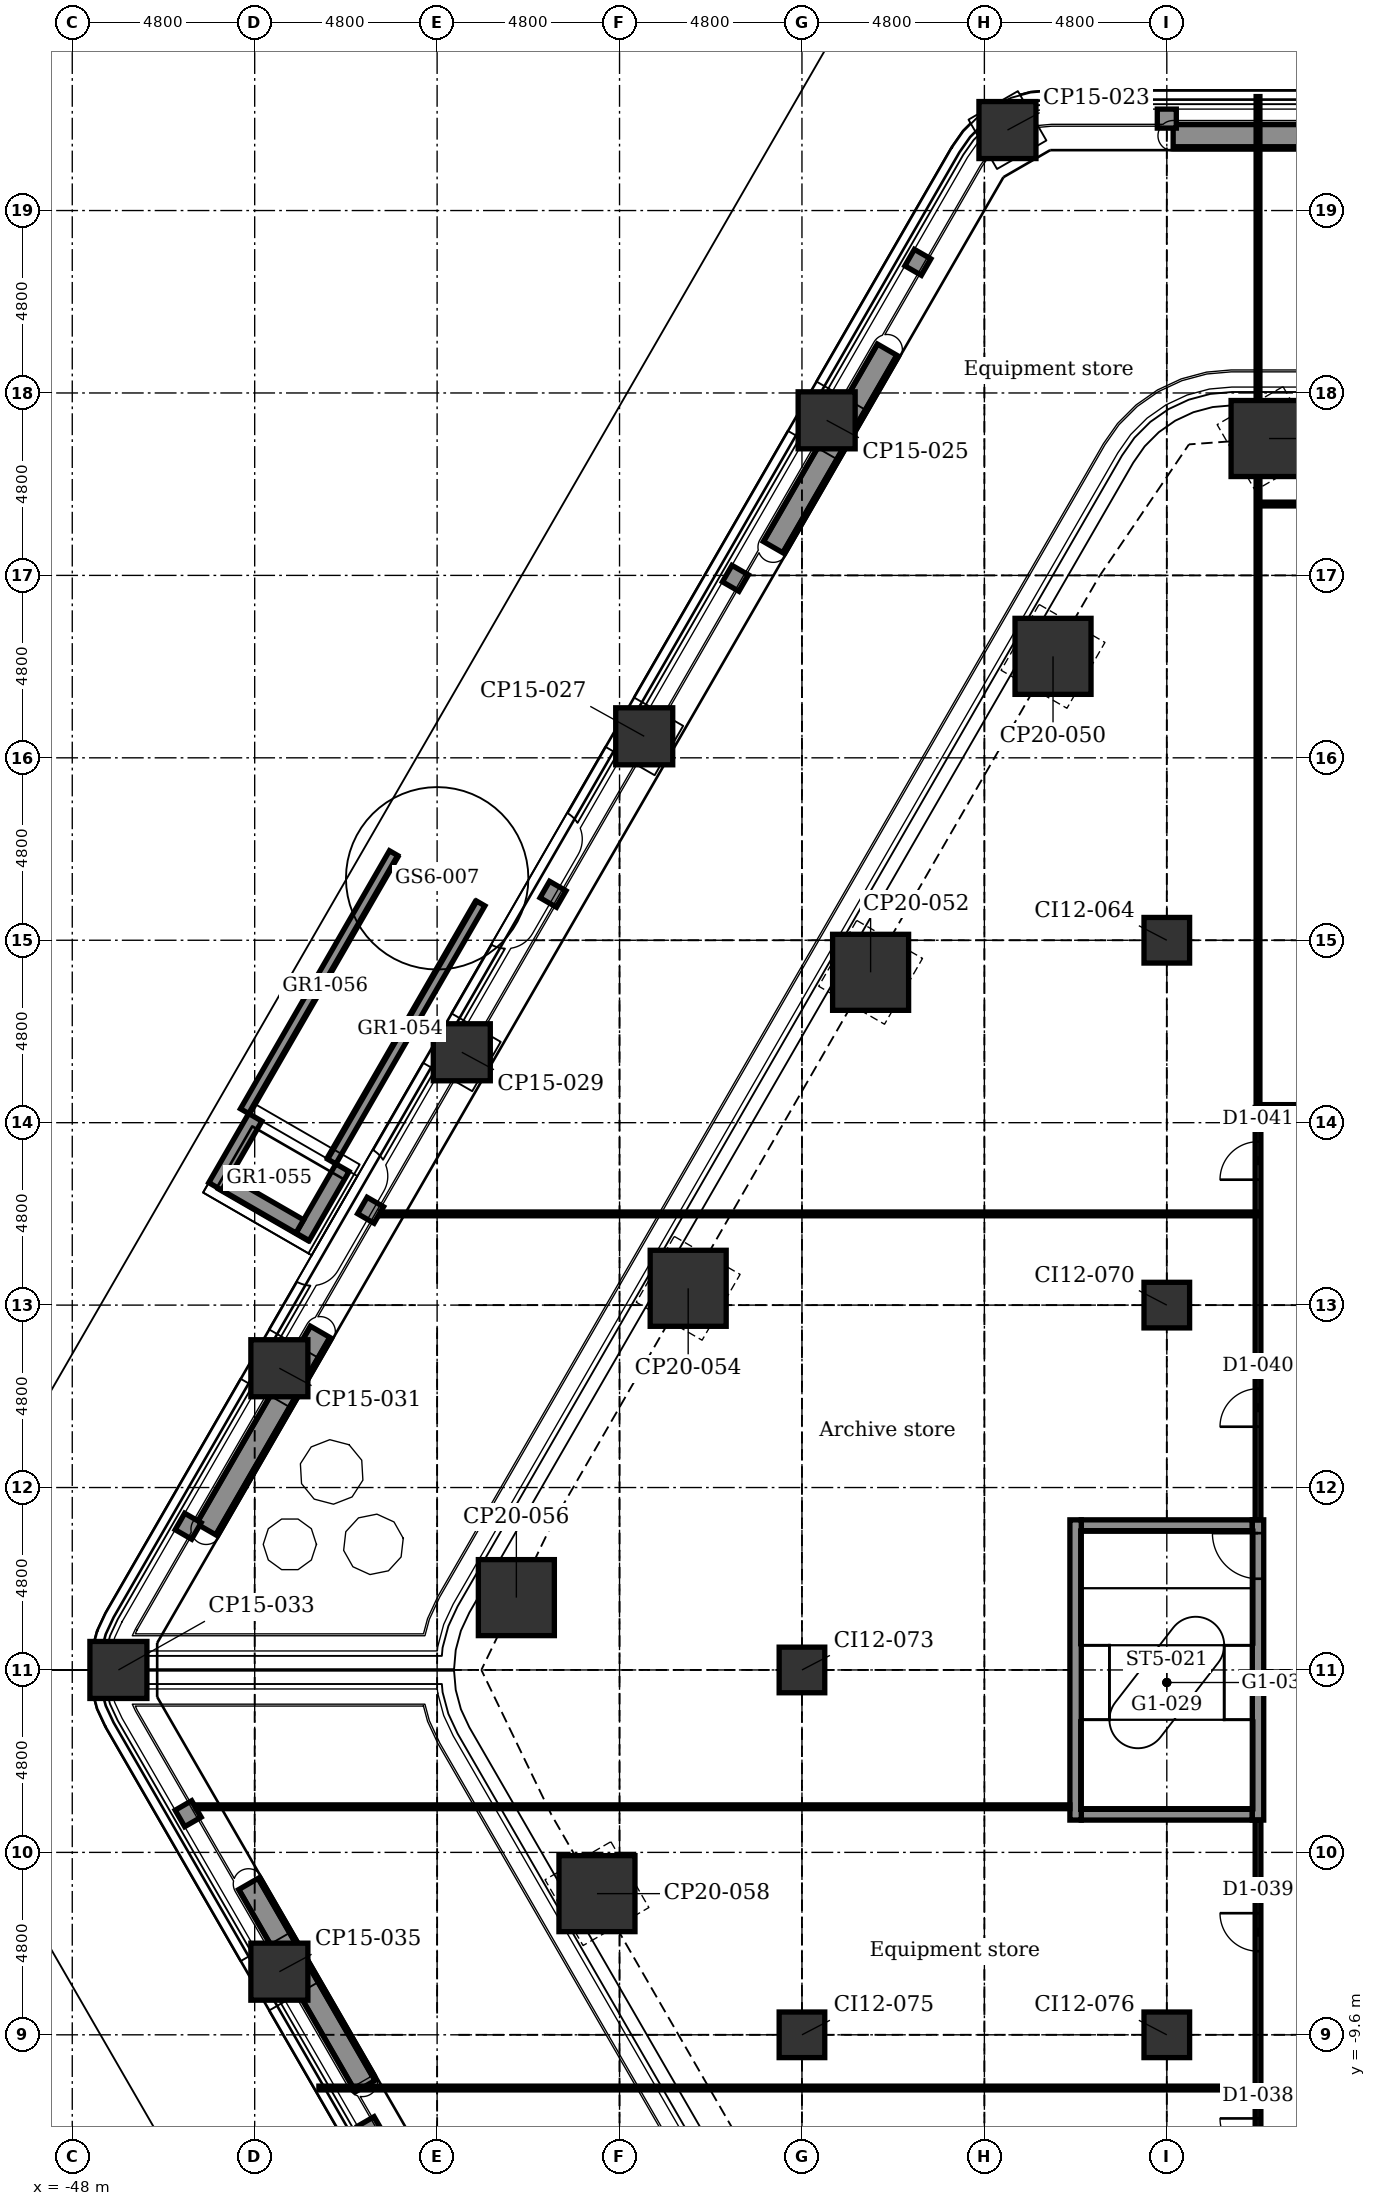
"""IFC4 building model, lengths in metres.
Left out: names, types, materials, properties, quantities, classifications, styles, units other than length and angle.
Written with IfcOpenShell. Run it as: python <this file> out.ifc"""

import sys

from ifc_helpers import new_model, si_unit, direction, frame, frame_2d, origin, origin_2d, place, context, subcontext, project, spatial, polyline, rectangle, outline, extrude, element, fill, save


model = new_model("IFC4")
c1 = context("Model", 3, precision=1e-05, world=origin(), true_north=direction((0.0, 1.0)))
c2 = subcontext(c1, "Body", "Model", "MODEL_VIEW")
j1 = project(units=[si_unit("LENGTHUNIT", "METRE"), si_unit("PLANEANGLEUNIT", "RADIAN")], contexts=[c1])
p1 = place(None, origin())
s1 = spatial("IfcSite", under=j1, at=p1, CompositionType="ELEMENT")
p2 = place(p1, origin())
s2 = spatial("IfcBuilding", under=s1, at=p2, CompositionType="ELEMENT")
p3 = place(p2, frame((0.0, 0.0, 12.4)))
s3 = spatial("IfcBuildingStorey", under=s2, at=p3, CompositionType="ELEMENT", Elevation=12.4)
for number, where, z_axis, x_axis in (
    (1, (-23.393, 40.518, -0.3), (0.0, 0.0, 1.0), (0.866, 0.5, 0.0)),
    (2, (-42.551, -7.939, -0.3), (0.0, 0.0, 1.0), (0.866, 0.5, 0.0)),
    (3, (-46.786, 0.0, -0.3), (0.0, 0.0, 1.0), (1.0, 0.0, 0.0)),
    (4, (-42.551, 7.939, -0.3), (0.0, 0.0, 1.0), (0.5, 0.866, 0.0)),
    (5, (-37.75, 16.253, -0.3), (0.0, 0.0, 1.0), (0.5, 0.866, 0.0)),
    (6, (-32.95, 24.567, -0.3), (0.0, 0.0, 1.0), (0.5, 0.866, 0.0)),
    (7, (-28.15, 32.88, -0.3), (0.0, 0.0, 1.0), (0.5, 0.866, 0.0)),
):
    element("IfcColumn", number, at=place(p3, frame(where, z_axis=z_axis, x_axis=x_axis)), inside=s3, PredefinedType="COLUMN", context=c2, shape_type="SweptSolid", body=[
        extrude(rectangle(XDim=1.5, YDim=1.5, at=origin_2d()), origin(), (0.0, 0.0, 1.0), 5.05),
    ])
for number, where, z_axis, x_axis in (
    (8, (-34.194, -5.885, -0.3), (0.0, 0.0, 1.0), (0.866, 0.5, 0.0)),
    (9, (-36.315, 1.904, -0.3), (0.0, 0.0, 1.0), (1.0, 0.0, 0.0)),
    (10, (-31.794, 10.042, -0.3), (0.0, 0.0, 1.0), (0.5, 0.866, 0.0)),
    (11, (-26.994, 18.356, -0.3), (0.0, 0.0, 1.0), (0.5, 0.866, 0.0)),
    (12, (-22.194, 26.67, -0.3), (0.0, 0.0, 1.0), (0.5, 0.866, 0.0)),
    (13, (-16.509, 32.401, -0.3), (0.0, 0.0, 1.0), (0.866, 0.5, 0.0)),
):
    element("IfcColumn", number, at=place(p3, frame(where, z_axis=z_axis, x_axis=x_axis)), inside=s3, PredefinedType="COLUMN", context=c2, shape_type="SweptSolid", body=[
        extrude(rectangle(XDim=2.0, YDim=2.0, at=origin_2d()), origin(), (0.0, 0.0, 1.0), 5.05),
    ])
for number, where, z_axis, x_axis in (
    (14, (-28.8, -9.6, -0.3), (0.0, 0.0, 1.0), (1.0, 0.0, 0.0)),
    (15, (-28.8, 0.0, -0.3), (0.0, 0.0, 1.0), (1.0, 0.0, 0.0)),
    (16, (-19.2, -9.6, -0.3), (0.0, 0.0, 1.0), (1.0, 0.0, 0.0)),
    (17, (-19.2, 9.6, -0.3), (0.0, 0.0, 1.0), (1.0, 0.0, 0.0)),
    (18, (-19.2, 19.2, -0.3), (0.0, 0.0, 1.0), (1.0, 0.0, 0.0)),
):
    element("IfcColumn", number, at=place(p3, frame(where, z_axis=z_axis, x_axis=x_axis)), inside=s3, PredefinedType="COLUMN", context=c2, shape_type="SweptSolid", body=[
        extrude(rectangle(XDim=1.2, YDim=1.2, at=origin_2d()), origin(), (0.0, 0.0, 1.0), 5.05),
    ])
for number, where, z_axis, x_axis in (
    (19, (-21.45, -3.8, -0.3), (0.0, 0.0, 1.0), (1.0, 0.0, 0.0)),
    (20, (-21.45, 3.8, -0.3), (0.0, 0.0, 1.0), (1.0, 0.0, 0.0)),
):
    element("IfcWall", number, at=place(p3, frame(where, z_axis=z_axis, x_axis=x_axis)), inside=s3, PredefinedType="STANDARD", context=c2, shape_type="SweptSolid", body=[
        extrude(rectangle(XDim=4.5, YDim=0.3, at=frame_2d((2.25, 0.0))), origin(), (0.0, 0.0, 1.0), 5.05),
    ])
p4 = place(p3, frame((-21.6, -3.95, -0.3), z_axis=(0.0, 0.0, 1.0), x_axis=(0.0, 1.0, 0.0)))
e21 = element("IfcWall", 21, at=p4, inside=s3, PredefinedType="STANDARD", context=c2, shape_type="SweptSolid", body=[
    extrude(rectangle(XDim=7.9, YDim=0.3, at=frame_2d((3.95, 0.0))), origin(), (0.0, 0.0, 1.0), 5.05),
])
p5 = place(p3, frame((-16.8, -3.95, -0.3), z_axis=(0.0, 0.0, 1.0), x_axis=(0.0, 1.0, 0.0)))
e22 = element("IfcWall", 22, at=p5, inside=s3, PredefinedType="STANDARD", context=c2, shape_type="SweptSolid", body=[
    extrude(rectangle(XDim=7.9, YDim=0.3, at=frame_2d((3.95, 0.0))), origin(), (0.0, 0.0, 1.0), 5.05),
])
p6 = place(p5, frame((6.35, 0.0, 0.3)))
e23 = element("IfcOpeningElement", 23, at=p6, cuts=e22, PredefinedType="OPENING", context=c2, shape_type="SweptSolid", body=[
    extrude(rectangle(XDim=1.2, YDim=2.1, at=frame_2d((0.6, 1.05))), frame((0.0, 0.16, 0.0), z_axis=(0.0, -1.0, 0.0), x_axis=(1.0, 0.0, 0.0)), (0.0, 0.0, 1.0), 0.32),
])
p7 = place(p3, frame((-19.033, 40.369, 5.0), z_axis=(0.0, 0.0, 1.0), x_axis=(1.0, 0.0, 0.0)))
e24 = element("IfcWall", 24, at=p7, inside=s3, PredefinedType="USERDEFINED", context=c2, shape_type="SweptSolid", body=[
    extrude(rectangle(XDim=6.0, YDim=0.6, at=frame_2d((3.0, 0.0))), origin(), (0.0, 0.0, 1.0), 0.7),
])
p8 = place(p3, frame((-40.292, -10.951, 5.0), z_axis=(0.0, 0.0, 1.0), x_axis=(-0.499976998774, 0.866038683141, 0.0)))
e25 = element("IfcWall", 25, at=p8, inside=s3, PredefinedType="USERDEFINED", context=c2, shape_type="SweptSolid", body=[
    extrude(rectangle(XDim=6.144, YDim=0.6, at=frame_2d((3.072, 0.0))), origin(), (0.0, 0.0, 1.0), 0.7),
])
for number, where, z_axis, x_axis in (
    (26, (-29.558, 29.543, 5.0), (0.0, 0.0, 1.0), (0.5, 0.866, 0.0)),
    (27, (-44.477, 3.702, 5.0), (0.0, 0.0, 1.0), (0.5, 0.866, 0.0)),
):
    element("IfcWall", number, at=place(p3, frame(where, z_axis=z_axis, x_axis=x_axis)), inside=s3, PredefinedType="USERDEFINED", context=c2, shape_type="SweptSolid", body=[
        extrude(rectangle(XDim=6.0, YDim=0.6, at=frame_2d((3.0, 0.0))), origin(), (0.0, 0.0, 1.0), 0.7),
    ])
for number, where, z_axis, x_axis in (
    (28, (-37.251, 20.167, 0.0), (0.0, 0.0, 1.0), (-0.5, -0.866, 0.0)),
    (29, (-39.546, 21.492, 0.0), (0.0, 0.0, 1.0), (-0.5, -0.866, 0.0)),
):
    element("IfcWall", number, at=place(p3, frame(where, z_axis=z_axis, x_axis=x_axis)), inside=s3, PredefinedType="SOLIDWALL", context=c2, shape_type="SweptSolid", body=[
        extrude(outline(polyline([(0.0, 0.0), (7.84, 0.0), (7.84, 5.1), (0.0, 0.272), (0.0, 0.0)])), frame((0.0, 0.125, 0.0), z_axis=(0.0, -1.0, 0.0), x_axis=(1.0, 0.0, 0.0)), (0.0, 0.0, 1.0), 0.25),
    ])
for number, where, z_axis, x_axis in (
    (30, (-44.235, 12.722, 0.45), (0.0, 0.0, 1.0), (0.5, 0.866, 0.0)),
    (31, (-41.94, 11.397, 0.45), (0.0, 0.0, 1.0), (0.5, 0.866, 0.0)),
):
    element("IfcWall", number, at=place(p3, frame(where, z_axis=z_axis, x_axis=x_axis)), inside=s3, PredefinedType="SOLIDWALL", context=c2, shape_type="SweptSolid", body=[
        extrude(rectangle(XDim=2.1, YDim=0.4, at=frame_2d((1.05, 0.0))), origin(), (0.0, 0.0, 1.0), 4.35),
    ])
p9 = place(p3, frame((-42.013, 11.67, 0.45), z_axis=(0.0, 0.0, 1.0), x_axis=(-0.866017533419, 0.500013631625, 0.0)))
e32 = element("IfcWall", 32, at=p9, inside=s3, PredefinedType="SOLIDWALL", context=c2, shape_type="SweptSolid", body=[
    extrude(rectangle(XDim=2.25, YDim=0.4, at=frame_2d((1.125, 0.0))), origin(), (0.0, 0.0, 1.0), 4.35),
])
for number, where, z_axis, x_axis in (
    (33, (-19.45, 40.819, 0.0), (0.0, 0.0, 1.0), (1.0, 0.0, 0.0)),
    (34, (-40.025, -12.312, 0.0), (0.0, 0.0, 1.0), (-0.5, 0.866, 0.0)),
    (35, (-44.825, -3.999, 0.0), (0.0, 0.0, 1.0), (-0.5, 0.866, 0.0)),
    (36, (-45.075, 3.565, 0.0), (0.0, 0.0, 1.0), (0.5, 0.866, 0.0)),
    (37, (-40.275, 11.879, 0.0), (0.0, 0.0, 1.0), (0.5, 0.866, 0.0)),
):
    element("IfcWall", number, at=place(p3, frame(where, z_axis=z_axis, x_axis=x_axis)), inside=s3, PredefinedType="SOLIDWALL", context=c2, shape_type="SweptSolid", body=[
        extrude(rectangle(XDim=0.5, YDim=0.5, at=frame_2d((0.25, 0.0))), origin(), (0.0, 0.0, 1.0), 4.45),
    ])
for number, where, z_axis, x_axis in (
    (38, (-35.475, 20.194, 0.0), (0.0, 0.0, 1.0), (0.5, 0.866, 0.0)),
    (39, (-30.675, 28.507, 0.0), (0.0, 0.0, 1.0), (0.5, 0.866, 0.0)),
    (40, (-25.875, 36.821, 0.0), (0.0, 0.0, 1.0), (0.5, 0.866, 0.0)),
):
    element("IfcWall", number, at=place(p3, frame(where, z_axis=z_axis, x_axis=x_axis)), inside=s3, PredefinedType="SOLIDWALL", context=c2, shape_type="SweptSolid", body=[
        extrude(rectangle(XDim=0.5, YDim=0.5, at=frame_2d((0.25, 0.0))), origin(), (0.0, 0.0, 1.0), 4.45),
    ])
p10 = place(p3, frame((-16.8, 14.8, 0.0), z_axis=(0.0, 0.0, 1.0), x_axis=(0.0, 1.0, 0.0)))
e41 = element("IfcWall", 41, at=p10, inside=s3, PredefinedType="PARTITIONING", context=c2, shape_type="SweptSolid", body=[
    extrude(rectangle(XDim=26.599, YDim=0.1, at=frame_2d((13.3, 0.0))), origin(), (0.0, 0.0, 1.0), 4.7),
])
p11 = place(p3, frame((-16.8, -13.6, 0.0), z_axis=(0.0, 0.0, 1.0), x_axis=(0.0, 1.0, 0.0)))
e42 = element("IfcWall", 42, at=p11, inside=s3, PredefinedType="PARTITIONING", context=c2, shape_type="SweptSolid", body=[
    extrude(rectangle(XDim=9.65, YDim=0.15, at=frame_2d((4.825, 0.0))), origin(), (0.0, 0.0, 1.0), 4.7),
])
p12 = place(p11, frame((0.8, 0.0, 0.0)))
e43 = element("IfcOpeningElement", 43, at=p12, cuts=e42, PredefinedType="OPENING", context=c2, shape_type="SweptSolid", body=[
    extrude(rectangle(XDim=1.0, YDim=2.1, at=frame_2d((0.5, 1.05))), frame((0.0, 0.085, 0.0), z_axis=(0.0, -1.0, 0.0), x_axis=(1.0, 0.0, 0.0)), (0.0, 0.0, 1.0), 0.17),
])
p13 = place(p11, frame((6.2, 0.0, 0.0)))
e44 = element("IfcOpeningElement", 44, at=p13, cuts=e42, PredefinedType="OPENING", context=c2, shape_type="SweptSolid", body=[
    extrude(rectangle(XDim=1.0, YDim=2.1, at=frame_2d((0.5, 1.05))), frame((0.0, 0.085, 0.0), z_axis=(0.0, -1.0, 0.0), x_axis=(1.0, 0.0, 0.0)), (0.0, 0.0, 1.0), 0.17),
])
p14 = place(p3, frame((-16.8, 3.95, 0.0), z_axis=(0.0, 0.0, 1.0), x_axis=(0.0, 1.0, 0.0)))
e45 = element("IfcWall", 45, at=p14, inside=s3, PredefinedType="PARTITIONING", context=c2, shape_type="SweptSolid", body=[
    extrude(rectangle(XDim=10.85, YDim=0.15, at=frame_2d((5.425, 0.0))), origin(), (0.0, 0.0, 1.0), 4.7),
])
p15 = place(p14, frame((2.45, 0.0, 0.0)))
e46 = element("IfcOpeningElement", 46, at=p15, cuts=e45, PredefinedType="OPENING", context=c2, shape_type="SweptSolid", body=[
    extrude(rectangle(XDim=1.0, YDim=2.1, at=frame_2d((0.5, 1.05))), frame((0.0, 0.085, 0.0), z_axis=(0.0, -1.0, 0.0), x_axis=(1.0, 0.0, 0.0)), (0.0, 0.0, 1.0), 0.17),
])
p16 = place(p14, frame((8.95, 0.0, 0.0)))
e47 = element("IfcOpeningElement", 47, at=p16, cuts=e45, PredefinedType="OPENING", context=c2, shape_type="SweptSolid", body=[
    extrude(rectangle(XDim=1.0, YDim=2.1, at=frame_2d((0.5, 1.05))), frame((0.0, 0.085, 0.0), z_axis=(0.0, -1.0, 0.0), x_axis=(1.0, 0.0, 0.0)), (0.0, 0.0, 1.0), 0.17),
])
p17 = place(p3, frame((-41.51, -11.0, 0.0), z_axis=(0.0, 0.0, 1.0), x_axis=(1.0, 0.0, 0.0)))
e48 = element("IfcWall", 48, at=p17, inside=s3, PredefinedType="PARTITIONING", context=c2, shape_type="SweptSolid", body=[
    extrude(rectangle(XDim=24.71, YDim=0.1, at=frame_2d((12.355, 0.0))), origin(), (0.0, 0.0, 1.0), 4.7),
])
p18 = place(p3, frame((-44.738, -3.6, 0.0), z_axis=(0.0, 0.0, 1.0), x_axis=(1.0, 0.0, 0.0)))
e49 = element("IfcWall", 49, at=p18, inside=s3, PredefinedType="PARTITIONING", context=c2, shape_type="SweptSolid", body=[
    extrude(rectangle(XDim=22.988, YDim=0.1, at=frame_2d((11.494, 0.0))), origin(), (0.0, 0.0, 1.0), 4.7),
])
p19 = place(p3, frame((-39.888, 12.0, 0.0), z_axis=(0.0, 0.0, 1.0), x_axis=(1.0, 0.0, 0.0)))
e50 = element("IfcWall", 50, at=p19, inside=s3, PredefinedType="PARTITIONING", context=c2, shape_type="SweptSolid", body=[
    extrude(rectangle(XDim=23.088, YDim=0.1, at=frame_2d((11.544, 0.0))), origin(), (0.0, 0.0, 1.0), 4.7),
])
p20 = place(p3, frame((-16.8, 14.8, 0.0), z_axis=(0.0, 0.0, 1.0), x_axis=(1.0, 0.0, 0.0)))
e51 = element("IfcWall", 51, at=p20, inside=s3, PredefinedType="PARTITIONING", context=c2, shape_type="SweptSolid", body=[
    extrude(rectangle(XDim=33.6, YDim=0.15, at=frame_2d((16.8, 0.0))), origin(), (0.0, 0.0, 1.0), 4.7),
])
p21 = place(p20, frame((3.75, 0.0, 0.0)))
e52 = element("IfcOpeningElement", 52, at=p21, cuts=e51, PredefinedType="OPENING", context=c2, shape_type="SweptSolid", body=[
    extrude(rectangle(XDim=0.9, YDim=2.1, at=frame_2d((0.45, 1.05))), frame((0.0, 0.085, 0.0), z_axis=(0.0, -1.0, 0.0), x_axis=(1.0, 0.0, 0.0)), (0.0, 0.0, 1.0), 0.17),
])
p22 = place(p20, frame((6.75, 0.0, 0.0)))
e53 = element("IfcOpeningElement", 53, at=p22, cuts=e51, PredefinedType="OPENING", context=c2, shape_type="SweptSolid", body=[
    extrude(rectangle(XDim=0.9, YDim=2.1, at=frame_2d((0.45, 1.05))), frame((0.0, 0.085, 0.0), z_axis=(0.0, -1.0, 0.0), x_axis=(1.0, 0.0, 0.0)), (0.0, 0.0, 1.0), 0.17),
])
p23 = place(p20, frame((9.7, 0.0, 0.0)))
e54 = element("IfcOpeningElement", 54, at=p23, cuts=e51, PredefinedType="OPENING", context=c2, shape_type="SweptSolid", body=[
    extrude(rectangle(XDim=1.0, YDim=2.1, at=frame_2d((0.5, 1.05))), frame((0.0, 0.085, 0.0), z_axis=(0.0, -1.0, 0.0), x_axis=(1.0, 0.0, 0.0)), (0.0, 0.0, 1.0), 0.17),
])
p24 = place(p20, frame((16.3, 0.0, 0.0)))
e55 = element("IfcOpeningElement", 55, at=p24, cuts=e51, PredefinedType="OPENING", context=c2, shape_type="SweptSolid", body=[
    extrude(rectangle(XDim=1.0, YDim=2.1, at=frame_2d((0.5, 1.05))), frame((0.0, 0.085, 0.0), z_axis=(0.0, -1.0, 0.0), x_axis=(1.0, 0.0, 0.0)), (0.0, 0.0, 1.0), 0.17),
])
p25 = place(p20, frame((27.1, 0.0, 0.0)))
e56 = element("IfcOpeningElement", 56, at=p25, cuts=e51, PredefinedType="OPENING", context=c2, shape_type="SweptSolid", body=[
    extrude(rectangle(XDim=1.0, YDim=2.1, at=frame_2d((0.5, 1.05))), frame((0.0, 0.085, 0.0), z_axis=(0.0, -1.0, 0.0), x_axis=(1.0, 0.0, 0.0)), (0.0, 0.0, 1.0), 0.17),
])
p26 = place(p3, frame((-16.8, 30.678, 0.0), z_axis=(0.0, 0.0, 1.0), x_axis=(1.0, 0.0, 0.0)))
e57 = element("IfcWall", 57, at=p26, inside=s3, PredefinedType="PARTITIONING", context=c2, shape_type="SweptSolid", body=[
    extrude(rectangle(XDim=21.6, YDim=0.1, at=frame_2d((10.8, 0.0))), origin(), (0.0, 0.0, 1.0), 4.7),
])
p27 = place(p12, origin())
e58 = element("IfcDoor", 58, at=p27, inside=s3, OperationType="SINGLE_SWING_RIGHT", PredefinedType="DOOR", context=c2, shape_type="SweptSolid", body=[
    extrude(rectangle(XDim=1.0, YDim=2.1, at=frame_2d((0.5, 1.05))), frame((0.0, 0.025, 0.0), z_axis=(0.0, -1.0, 0.0), x_axis=(1.0, 0.0, 0.0)), (0.0, 0.0, 1.0), 0.05),
])
fill(e43, e58)
p28 = place(p13, origin())
e59 = element("IfcDoor", 59, at=p28, inside=s3, OperationType="SINGLE_SWING_RIGHT", PredefinedType="DOOR", context=c2, shape_type="SweptSolid", body=[
    extrude(rectangle(XDim=1.0, YDim=2.1, at=frame_2d((0.5, 1.05))), frame((0.0, 0.025, 0.0), z_axis=(0.0, -1.0, 0.0), x_axis=(1.0, 0.0, 0.0)), (0.0, 0.0, 1.0), 0.05),
])
fill(e44, e59)
p29 = place(p15, origin())
e60 = element("IfcDoor", 60, at=p29, inside=s3, OperationType="SINGLE_SWING_LEFT", PredefinedType="DOOR", context=c2, shape_type="SweptSolid", body=[
    extrude(rectangle(XDim=1.0, YDim=2.1, at=frame_2d((0.5, 1.05))), frame((0.0, 0.025, 0.0), z_axis=(0.0, -1.0, 0.0), x_axis=(1.0, 0.0, 0.0)), (0.0, 0.0, 1.0), 0.05),
])
fill(e46, e60)
p30 = place(p16, origin())
e61 = element("IfcDoor", 61, at=p30, inside=s3, OperationType="SINGLE_SWING_LEFT", PredefinedType="DOOR", context=c2, shape_type="SweptSolid", body=[
    extrude(rectangle(XDim=1.0, YDim=2.1, at=frame_2d((0.5, 1.05))), frame((0.0, 0.025, 0.0), z_axis=(0.0, -1.0, 0.0), x_axis=(1.0, 0.0, 0.0)), (0.0, 0.0, 1.0), 0.05),
])
fill(e47, e61)
p31 = place(p6, origin())
e62 = element("IfcDoor", 62, at=p31, inside=s3, OperationType="SINGLE_SWING_RIGHT", PredefinedType="DOOR", context=c2, shape_type="SweptSolid", body=[
    extrude(rectangle(XDim=1.2, YDim=2.1, at=frame_2d((0.6, 1.05))), frame((0.0, 0.025, 0.0), z_axis=(0.0, -1.0, 0.0), x_axis=(1.0, 0.0, 0.0)), (0.0, 0.0, 1.0), 0.05),
])
fill(e23, e62)
save(model, sys.argv[1])
